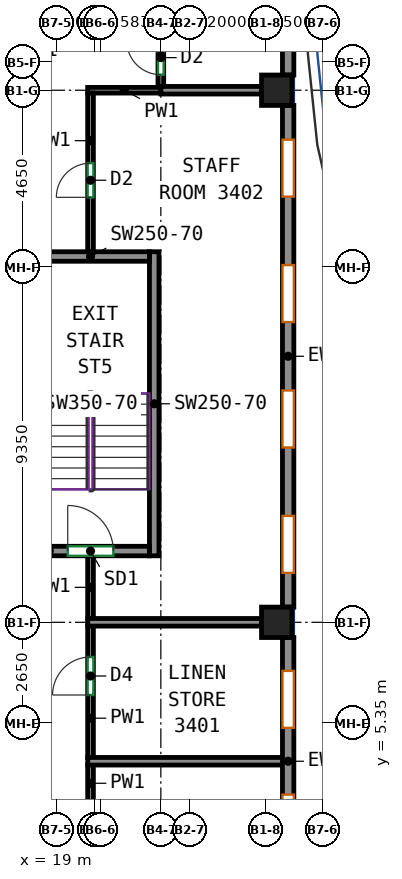
"""IFC4 building model, lengths in metres.
Left out: names, types, materials, properties, quantities, classifications, styles, units other than length and angle.
Written with IfcOpenShell. Run it as: python <this file> out.ifc"""

import sys

from ifc_helpers import new_model, si_unit, direction, frame, frame_2d, origin, origin_2d, place, context, subcontext, project, spatial, rectangle, extrude, source, transform, mapped, element, fill, save


model = new_model("IFC4")
c1 = context("Model", 3, precision=1e-05, world=origin(), true_north=direction((0.0, 1.0)))
c2 = subcontext(c1, "Body", "Model", "MODEL_VIEW")
j1 = project(units=[si_unit("LENGTHUNIT", "METRE"), si_unit("PLANEANGLEUNIT", "RADIAN")], contexts=[c1])
p1 = place(None, origin())
s1 = spatial("IfcSite", under=j1, at=p1, CompositionType="ELEMENT")
p2 = place(p1, origin())
s2 = spatial("IfcBuilding", under=s1, at=p2, CompositionType="ELEMENT")
p3 = place(p2, frame((0.0, 0.0, 150.7)))
s3 = spatial("IfcBuildingStorey", under=s2, at=p3, CompositionType="ELEMENT", Elevation=150.7)
m1 = source(origin(), c2, "Body", "SweptSolid", [
    extrude(rectangle(XDim=0.8, YDim=0.8, at=origin_2d()), origin(), (0.0, 0.0, 1.0), 3.12),
])
for number, where, z_axis, x_axis in (
    (1, (24.8, 8.0, 0.0), (0.0, 0.0, 1.0), (1.0, 0.0, 0.0)),
    (2, (24.8, 22.0, 0.0), (0.0, 0.0, 1.0), (1.0, 0.0, 0.0)),
):
    element("IfcColumn", number, at=place(p3, frame(where, z_axis=z_axis, x_axis=x_axis)), inside=s3, PredefinedType="COLUMN", context=c2, shape_type="MappedRepresentation", body=[
        mapped(m1, transform((0.0, 0.0, 0.0))),
    ])
m2 = source(origin(), c2, "Body", "SweptSolid", [
    extrude(rectangle(XDim=8.0, YDim=0.25, at=frame_2d((4.0, 0.0))), origin(), (0.0, 0.0, 1.0), 3.12),
])
p4 = place(p3, frame((21.575, 9.75, 0.0), z_axis=(0.0, 0.0, 1.0), x_axis=(0.0, 1.0, 0.0)))
e3 = element("IfcWall", 3, at=p4, inside=s3, PredefinedType="SHEAR", context=c2, shape_type="MappedRepresentation", body=[
    mapped(m2, transform((0.0, 0.0, 0.0))),
])
m3 = source(origin(), c2, "Body", "SweptSolid", [
    extrude(rectangle(XDim=3.1, YDim=0.25, at=frame_2d((1.55, 0.0))), origin(), (0.0, 0.0, 1.0), 3.12),
])
p5 = place(p3, frame((18.35, 9.875, 0.0), z_axis=(0.0, 0.0, 1.0), x_axis=(1.0, 0.0, 0.0)))
e4 = element("IfcWall", 4, at=p5, inside=s3, PredefinedType="SHEAR", context=c2, shape_type="MappedRepresentation", body=[
    mapped(m3, transform((0.0, 0.0, 0.0))),
])
p6 = place(p5, frame((0.95, 0.0, 0.0)))
e5 = element("IfcOpeningElement", 5, at=p6, cuts=e4, PredefinedType="OPENING", context=c2, shape_type="SweptSolid", body=[
    extrude(rectangle(XDim=1.2, YDim=2.1, at=frame_2d((0.6, 1.05))), frame((0.0, 0.135, 0.0), z_axis=(0.0, -1.0, 0.0), x_axis=(1.0, 0.0, 0.0)), (0.0, 0.0, 1.0), 0.27),
])
p7 = place(p3, frame((18.35, 17.625, 0.0), z_axis=(0.0, 0.0, 1.0), x_axis=(1.0, 0.0, 0.0)))
e6 = element("IfcWall", 6, at=p7, inside=s3, PredefinedType="SHEAR", context=c2, shape_type="MappedRepresentation", body=[
    mapped(m3, transform((0.0, 0.0, 0.0))),
])
m4 = source(origin(), c2, "Body", "SweptSolid", [
    extrude(rectangle(XDim=6.513, YDim=0.3, at=frame_2d((3.256, 0.0))), origin(), (0.0, 0.0, 1.0), 3.12),
])
p8 = place(p3, frame((25.1, 1.087, 0.0), z_axis=(0.0, 0.0, 1.0), x_axis=(0.0, 1.0, 0.0)))
e7 = element("IfcWall", 7, at=p8, inside=s3, PredefinedType="SOLIDWALL", context=c2, shape_type="MappedRepresentation", body=[
    mapped(m4, transform((0.0, 0.0, 0.0))),
])
p9 = place(p8, frame((0.878, 0.0, 0.85)))
e8 = element("IfcOpeningElement", 8, at=p9, cuts=e7, PredefinedType="OPENING", context=c2, shape_type="SweptSolid", body=[
    extrude(rectangle(XDim=1.5, YDim=1.95, at=frame_2d((0.75, 0.975))), frame((0.0, 0.16, 0.0), z_axis=(0.0, -1.0, 0.0), x_axis=(1.0, 0.0, 0.0)), (0.0, 0.0, 1.0), 0.32),
])
p10 = place(p8, frame((4.135, 0.0, 0.85)))
e9 = element("IfcOpeningElement", 9, at=p10, cuts=e7, PredefinedType="OPENING", context=c2, shape_type="SweptSolid", body=[
    extrude(rectangle(XDim=1.5, YDim=1.95, at=frame_2d((0.75, 0.975))), frame((0.0, 0.16, 0.0), z_axis=(0.0, -1.0, 0.0), x_axis=(1.0, 0.0, 0.0)), (0.0, 0.0, 1.0), 0.32),
])
m5 = source(origin(), c2, "Body", "SweptSolid", [
    extrude(rectangle(XDim=13.2, YDim=0.3, at=frame_2d((6.6, 0.0))), origin(), (0.0, 0.0, 1.0), 3.12),
])
p11 = place(p3, frame((25.1, 8.4, 0.0), z_axis=(0.0, 0.0, 1.0), x_axis=(0.0, 1.0, 0.0)))
e10 = element("IfcWall", 10, at=p11, inside=s3, PredefinedType="SOLIDWALL", context=c2, shape_type="MappedRepresentation", body=[
    mapped(m5, transform((0.0, 0.0, 0.0))),
])
p12 = place(p11, frame((0.9, 0.0, 0.85)))
e11 = element("IfcOpeningElement", 11, at=p12, cuts=e10, PredefinedType="OPENING", context=c2, shape_type="SweptSolid", body=[
    extrude(rectangle(XDim=1.5, YDim=1.95, at=frame_2d((0.75, 0.975))), frame((0.0, 0.16, 0.0), z_axis=(0.0, -1.0, 0.0), x_axis=(1.0, 0.0, 0.0)), (0.0, 0.0, 1.0), 0.32),
])
p13 = place(p11, frame((4.2, 0.0, 0.85)))
e12 = element("IfcOpeningElement", 12, at=p13, cuts=e10, PredefinedType="OPENING", context=c2, shape_type="SweptSolid", body=[
    extrude(rectangle(XDim=1.5, YDim=1.95, at=frame_2d((0.75, 0.975))), frame((0.0, 0.16, 0.0), z_axis=(0.0, -1.0, 0.0), x_axis=(1.0, 0.0, 0.0)), (0.0, 0.0, 1.0), 0.32),
])
p14 = place(p11, frame((7.5, 0.0, 0.85)))
e13 = element("IfcOpeningElement", 13, at=p14, cuts=e10, PredefinedType="OPENING", context=c2, shape_type="SweptSolid", body=[
    extrude(rectangle(XDim=1.5, YDim=1.95, at=frame_2d((0.75, 0.975))), frame((0.0, 0.16, 0.0), z_axis=(0.0, -1.0, 0.0), x_axis=(1.0, 0.0, 0.0)), (0.0, 0.0, 1.0), 0.32),
])
p15 = place(p11, frame((10.8, 0.0, 0.85)))
e14 = element("IfcOpeningElement", 14, at=p15, cuts=e10, PredefinedType="OPENING", context=c2, shape_type="SweptSolid", body=[
    extrude(rectangle(XDim=1.5, YDim=1.95, at=frame_2d((0.75, 0.975))), frame((0.0, 0.16, 0.0), z_axis=(0.0, -1.0, 0.0), x_axis=(1.0, 0.0, 0.0)), (0.0, 0.0, 1.0), 0.32),
])
m6 = source(origin(), c2, "Body", "SweptSolid", [
    extrude(rectangle(XDim=4.95, YDim=0.3, at=frame_2d((2.475, 0.0))), origin(), (0.0, 0.0, 1.0), 3.12),
])
p16 = place(p3, frame((25.1, 22.4, 0.0), z_axis=(0.0, 0.0, 1.0), x_axis=(0.0, 1.0, 0.0)))
e15 = element("IfcWall", 15, at=p16, inside=s3, PredefinedType="SOLIDWALL", context=c2, shape_type="MappedRepresentation", body=[
    mapped(m6, transform((0.0, 0.0, 0.0))),
])
p17 = place(p16, frame((1.75, 0.0, 0.85)))
e16 = element("IfcOpeningElement", 16, at=p17, cuts=e15, PredefinedType="OPENING", context=c2, shape_type="SweptSolid", body=[
    extrude(rectangle(XDim=1.5, YDim=1.95, at=frame_2d((0.75, 0.975))), frame((0.0, 0.16, 0.0), z_axis=(0.0, -1.0, 0.0), x_axis=(1.0, 0.0, 0.0)), (0.0, 0.0, 1.0), 0.32),
])
p18 = place(p3, frame((21.75, 22.1, 0.0), z_axis=(0.0, 0.0, 1.0), x_axis=(0.0, 1.0, 0.0)))
e17 = element("IfcWall", 17, at=p18, inside=s3, PredefinedType="PARTITIONING", context=c2, shape_type="SweptSolid", body=[
    extrude(rectangle(XDim=1.625, YDim=0.15, at=frame_2d((0.812, 0.0))), origin(), (0.0, 0.0, 1.0), 3.12),
])
p19 = place(p18, frame((0.308, 0.0, 0.0)))
e18 = element("IfcOpeningElement", 18, at=p19, cuts=e17, PredefinedType="OPENING", context=c2, shape_type="SweptSolid", body=[
    extrude(rectangle(XDim=0.9, YDim=2.1, at=frame_2d((0.45, 1.05))), frame((0.0, 0.085, 0.0), z_axis=(0.0, -1.0, 0.0), x_axis=(1.0, 0.0, 0.0)), (0.0, 0.0, 1.0), 0.17),
])
p20 = place(p3, frame((19.9, 4.434, 0.0), z_axis=(0.0, 0.0, 1.0), x_axis=(0.0, 1.0, 0.0)))
e19 = element("IfcWall", 19, at=p20, inside=s3, PredefinedType="PARTITIONING", context=c2, shape_type="SweptSolid", body=[
    extrude(rectangle(XDim=3.476, YDim=0.15, at=frame_2d((1.738, 0.0))), origin(), (0.0, 0.0, 1.0), 3.12),
])
p21 = place(p20, frame((1.653, 0.0, 0.0)))
e20 = element("IfcOpeningElement", 20, at=p21, cuts=e19, PredefinedType="OPENING", context=c2, shape_type="SweptSolid", body=[
    extrude(rectangle(XDim=1.0, YDim=2.1, at=frame_2d((0.5, 1.05))), frame((0.0, 0.085, 0.0), z_axis=(0.0, -1.0, 0.0), x_axis=(1.0, 0.0, 0.0)), (0.0, 0.0, 1.0), 0.17),
])
p22 = place(p3, frame((19.825, 22.0, 0.0), z_axis=(0.0, 0.0, 1.0), x_axis=(1.0, 0.0, 0.0)))
e21 = element("IfcWall", 21, at=p22, inside=s3, PredefinedType="PARTITIONING", context=c2, shape_type="SweptSolid", body=[
    extrude(rectangle(XDim=1.925, YDim=0.15, at=frame_2d((0.962, 0.0))), origin(), (0.0, 0.0, 1.0), 3.12),
])
p23 = place(p3, frame((19.9, 17.75, 0.0), z_axis=(0.0, 0.0, 1.0), x_axis=(0.0, 1.0, 0.0)))
e22 = element("IfcWall", 22, at=p23, inside=s3, PredefinedType="PARTITIONING", context=c2, shape_type="SweptSolid", body=[
    extrude(rectangle(XDim=4.175, YDim=0.15, at=frame_2d((2.087, 0.0))), origin(), (0.0, 0.0, 1.0), 3.12),
])
p24 = place(p23, frame((1.432, 0.0, 0.0)))
e23 = element("IfcOpeningElement", 23, at=p24, cuts=e22, PredefinedType="OPENING", context=c2, shape_type="SweptSolid", body=[
    extrude(rectangle(XDim=0.9, YDim=2.1, at=frame_2d((0.45, 1.05))), frame((0.0, 0.085, 0.0), z_axis=(0.0, -1.0, 0.0), x_axis=(1.0, 0.0, 0.0)), (0.0, 0.0, 1.0), 0.17),
])
p25 = place(p3, frame((19.9, 8.09, 0.0), z_axis=(0.0, 0.0, 1.0), x_axis=(0.0, 1.0, 0.0)))
e24 = element("IfcWall", 24, at=p25, inside=s3, PredefinedType="PARTITIONING", context=c2, shape_type="SweptSolid", body=[
    extrude(rectangle(XDim=1.66, YDim=0.15, at=frame_2d((0.83, 0.0))), origin(), (0.0, 0.0, 1.0), 3.12),
])
p26 = place(p3, frame((19.9, 3.275, 0.0), z_axis=(0.0, 0.0, 1.0), x_axis=(0.0, 1.0, 0.0)))
e25 = element("IfcWall", 25, at=p26, inside=s3, PredefinedType="PARTITIONING", context=c2, shape_type="SweptSolid", body=[
    extrude(rectangle(XDim=0.979, YDim=0.15, at=frame_2d((0.49, 0.0))), origin(), (0.0, 0.0, 1.0), 3.12),
])
p27 = place(p3, frame((21.752, 22.0, 0.0), z_axis=(0.0, 0.0, 1.0), x_axis=(1.0, 0.0, 0.0)))
e26 = element("IfcWall", 26, at=p27, inside=s3, PredefinedType="PARTITIONING", context=c2, shape_type="SweptSolid", body=[
    extrude(rectangle(XDim=2.648, YDim=0.2, at=frame_2d((1.324, 0.0))), origin(), (0.0, 0.0, 1.0), 3.12),
])
p28 = place(p3, frame((19.827, 8.0, 0.0), z_axis=(0.0, 0.0, 1.0), x_axis=(1.0, 0.0, 0.0)))
e27 = element("IfcWall", 27, at=p28, inside=s3, PredefinedType="PARTITIONING", context=c2, shape_type="SweptSolid", body=[
    extrude(rectangle(XDim=4.573, YDim=0.2, at=frame_2d((2.287, 0.0))), origin(), (0.0, 0.0, 1.0), 3.12),
])
p29 = place(p3, frame((19.827, 4.344, 0.0), z_axis=(0.0, 0.0, 1.0), x_axis=(1.0, 0.0, 0.0)))
e28 = element("IfcWall", 28, at=p29, inside=s3, PredefinedType="PARTITIONING", context=c2, shape_type="SweptSolid", body=[
    extrude(rectangle(XDim=5.173, YDim=0.2, at=frame_2d((2.586, 0.0))), origin(), (0.0, 0.0, 1.0), 3.12),
])
p30 = place(p9, origin())
e29 = element("IfcWindow", 29, at=p30, inside=s3, PartitioningType="SINGLE_PANEL", PredefinedType="WINDOW", context=c2, shape_type="SweptSolid", body=[
    extrude(rectangle(XDim=1.5, YDim=1.95, at=frame_2d((0.75, 0.975))), frame((0.0, 0.03, 0.0), z_axis=(0.0, -1.0, 0.0), x_axis=(1.0, 0.0, 0.0)), (0.0, 0.0, 1.0), 0.06),
])
fill(e8, e29)
p31 = place(p10, origin())
e30 = element("IfcWindow", 30, at=p31, inside=s3, PartitioningType="SINGLE_PANEL", PredefinedType="WINDOW", context=c2, shape_type="SweptSolid", body=[
    extrude(rectangle(XDim=1.5, YDim=1.95, at=frame_2d((0.75, 0.975))), frame((0.0, 0.03, 0.0), z_axis=(0.0, -1.0, 0.0), x_axis=(1.0, 0.0, 0.0)), (0.0, 0.0, 1.0), 0.06),
])
fill(e9, e30)
p32 = place(p12, origin())
e31 = element("IfcWindow", 31, at=p32, inside=s3, PartitioningType="SINGLE_PANEL", PredefinedType="WINDOW", context=c2, shape_type="SweptSolid", body=[
    extrude(rectangle(XDim=1.5, YDim=1.95, at=frame_2d((0.75, 0.975))), frame((0.0, 0.03, 0.0), z_axis=(0.0, -1.0, 0.0), x_axis=(1.0, 0.0, 0.0)), (0.0, 0.0, 1.0), 0.06),
])
fill(e11, e31)
p33 = place(p13, origin())
e32 = element("IfcWindow", 32, at=p33, inside=s3, PartitioningType="SINGLE_PANEL", PredefinedType="WINDOW", context=c2, shape_type="SweptSolid", body=[
    extrude(rectangle(XDim=1.5, YDim=1.95, at=frame_2d((0.75, 0.975))), frame((0.0, 0.03, 0.0), z_axis=(0.0, -1.0, 0.0), x_axis=(1.0, 0.0, 0.0)), (0.0, 0.0, 1.0), 0.06),
])
fill(e12, e32)
p34 = place(p14, origin())
e33 = element("IfcWindow", 33, at=p34, inside=s3, PartitioningType="SINGLE_PANEL", PredefinedType="WINDOW", context=c2, shape_type="SweptSolid", body=[
    extrude(rectangle(XDim=1.5, YDim=1.95, at=frame_2d((0.75, 0.975))), frame((0.0, 0.03, 0.0), z_axis=(0.0, -1.0, 0.0), x_axis=(1.0, 0.0, 0.0)), (0.0, 0.0, 1.0), 0.06),
])
fill(e13, e33)
p35 = place(p15, origin())
e34 = element("IfcWindow", 34, at=p35, inside=s3, PartitioningType="SINGLE_PANEL", PredefinedType="WINDOW", context=c2, shape_type="SweptSolid", body=[
    extrude(rectangle(XDim=1.5, YDim=1.95, at=frame_2d((0.75, 0.975))), frame((0.0, 0.03, 0.0), z_axis=(0.0, -1.0, 0.0), x_axis=(1.0, 0.0, 0.0)), (0.0, 0.0, 1.0), 0.06),
])
fill(e14, e34)
p36 = place(p6, origin())
e35 = element("IfcDoor", 35, at=p36, inside=s3, OperationType="DOUBLE_DOOR_SINGLE_SWING", PredefinedType="DOOR", context=c2, shape_type="SweptSolid", body=[
    extrude(rectangle(XDim=1.2, YDim=2.1, at=frame_2d((0.6, 1.05))), frame((0.0, 0.025, 0.0), z_axis=(0.0, -1.0, 0.0), x_axis=(1.0, 0.0, 0.0)), (0.0, 0.0, 1.0), 0.05),
])
fill(e5, e35)
p37 = place(p21, origin())
e36 = element("IfcDoor", 36, at=p37, inside=s3, OperationType="SINGLE_SWING_LEFT", PredefinedType="DOOR", context=c2, shape_type="SweptSolid", body=[
    extrude(rectangle(XDim=1.0, YDim=2.1, at=frame_2d((0.5, 1.05))), frame((0.0, 0.025, 0.0), z_axis=(0.0, -1.0, 0.0), x_axis=(1.0, 0.0, 0.0)), (0.0, 0.0, 1.0), 0.05),
])
fill(e20, e36)
p38 = place(p24, origin())
e37 = element("IfcDoor", 37, at=p38, inside=s3, OperationType="SINGLE_SWING_LEFT", PredefinedType="DOOR", context=c2, shape_type="SweptSolid", body=[
    extrude(rectangle(XDim=0.9, YDim=2.1, at=frame_2d((0.45, 1.05))), frame((0.0, 0.025, 0.0), z_axis=(0.0, -1.0, 0.0), x_axis=(1.0, 0.0, 0.0)), (0.0, 0.0, 1.0), 0.05),
])
fill(e23, e37)
p39 = place(p19, origin())
e38 = element("IfcDoor", 38, at=p39, inside=s3, OperationType="SINGLE_SWING_RIGHT", PredefinedType="DOOR", context=c2, shape_type="SweptSolid", body=[
    extrude(rectangle(XDim=0.9, YDim=2.1, at=frame_2d((0.45, 1.05))), frame((0.0, 0.025, 0.0), z_axis=(0.0, -1.0, 0.0), x_axis=(1.0, 0.0, 0.0)), (0.0, 0.0, 1.0), 0.05),
])
fill(e18, e38)
save(model, sys.argv[1])
